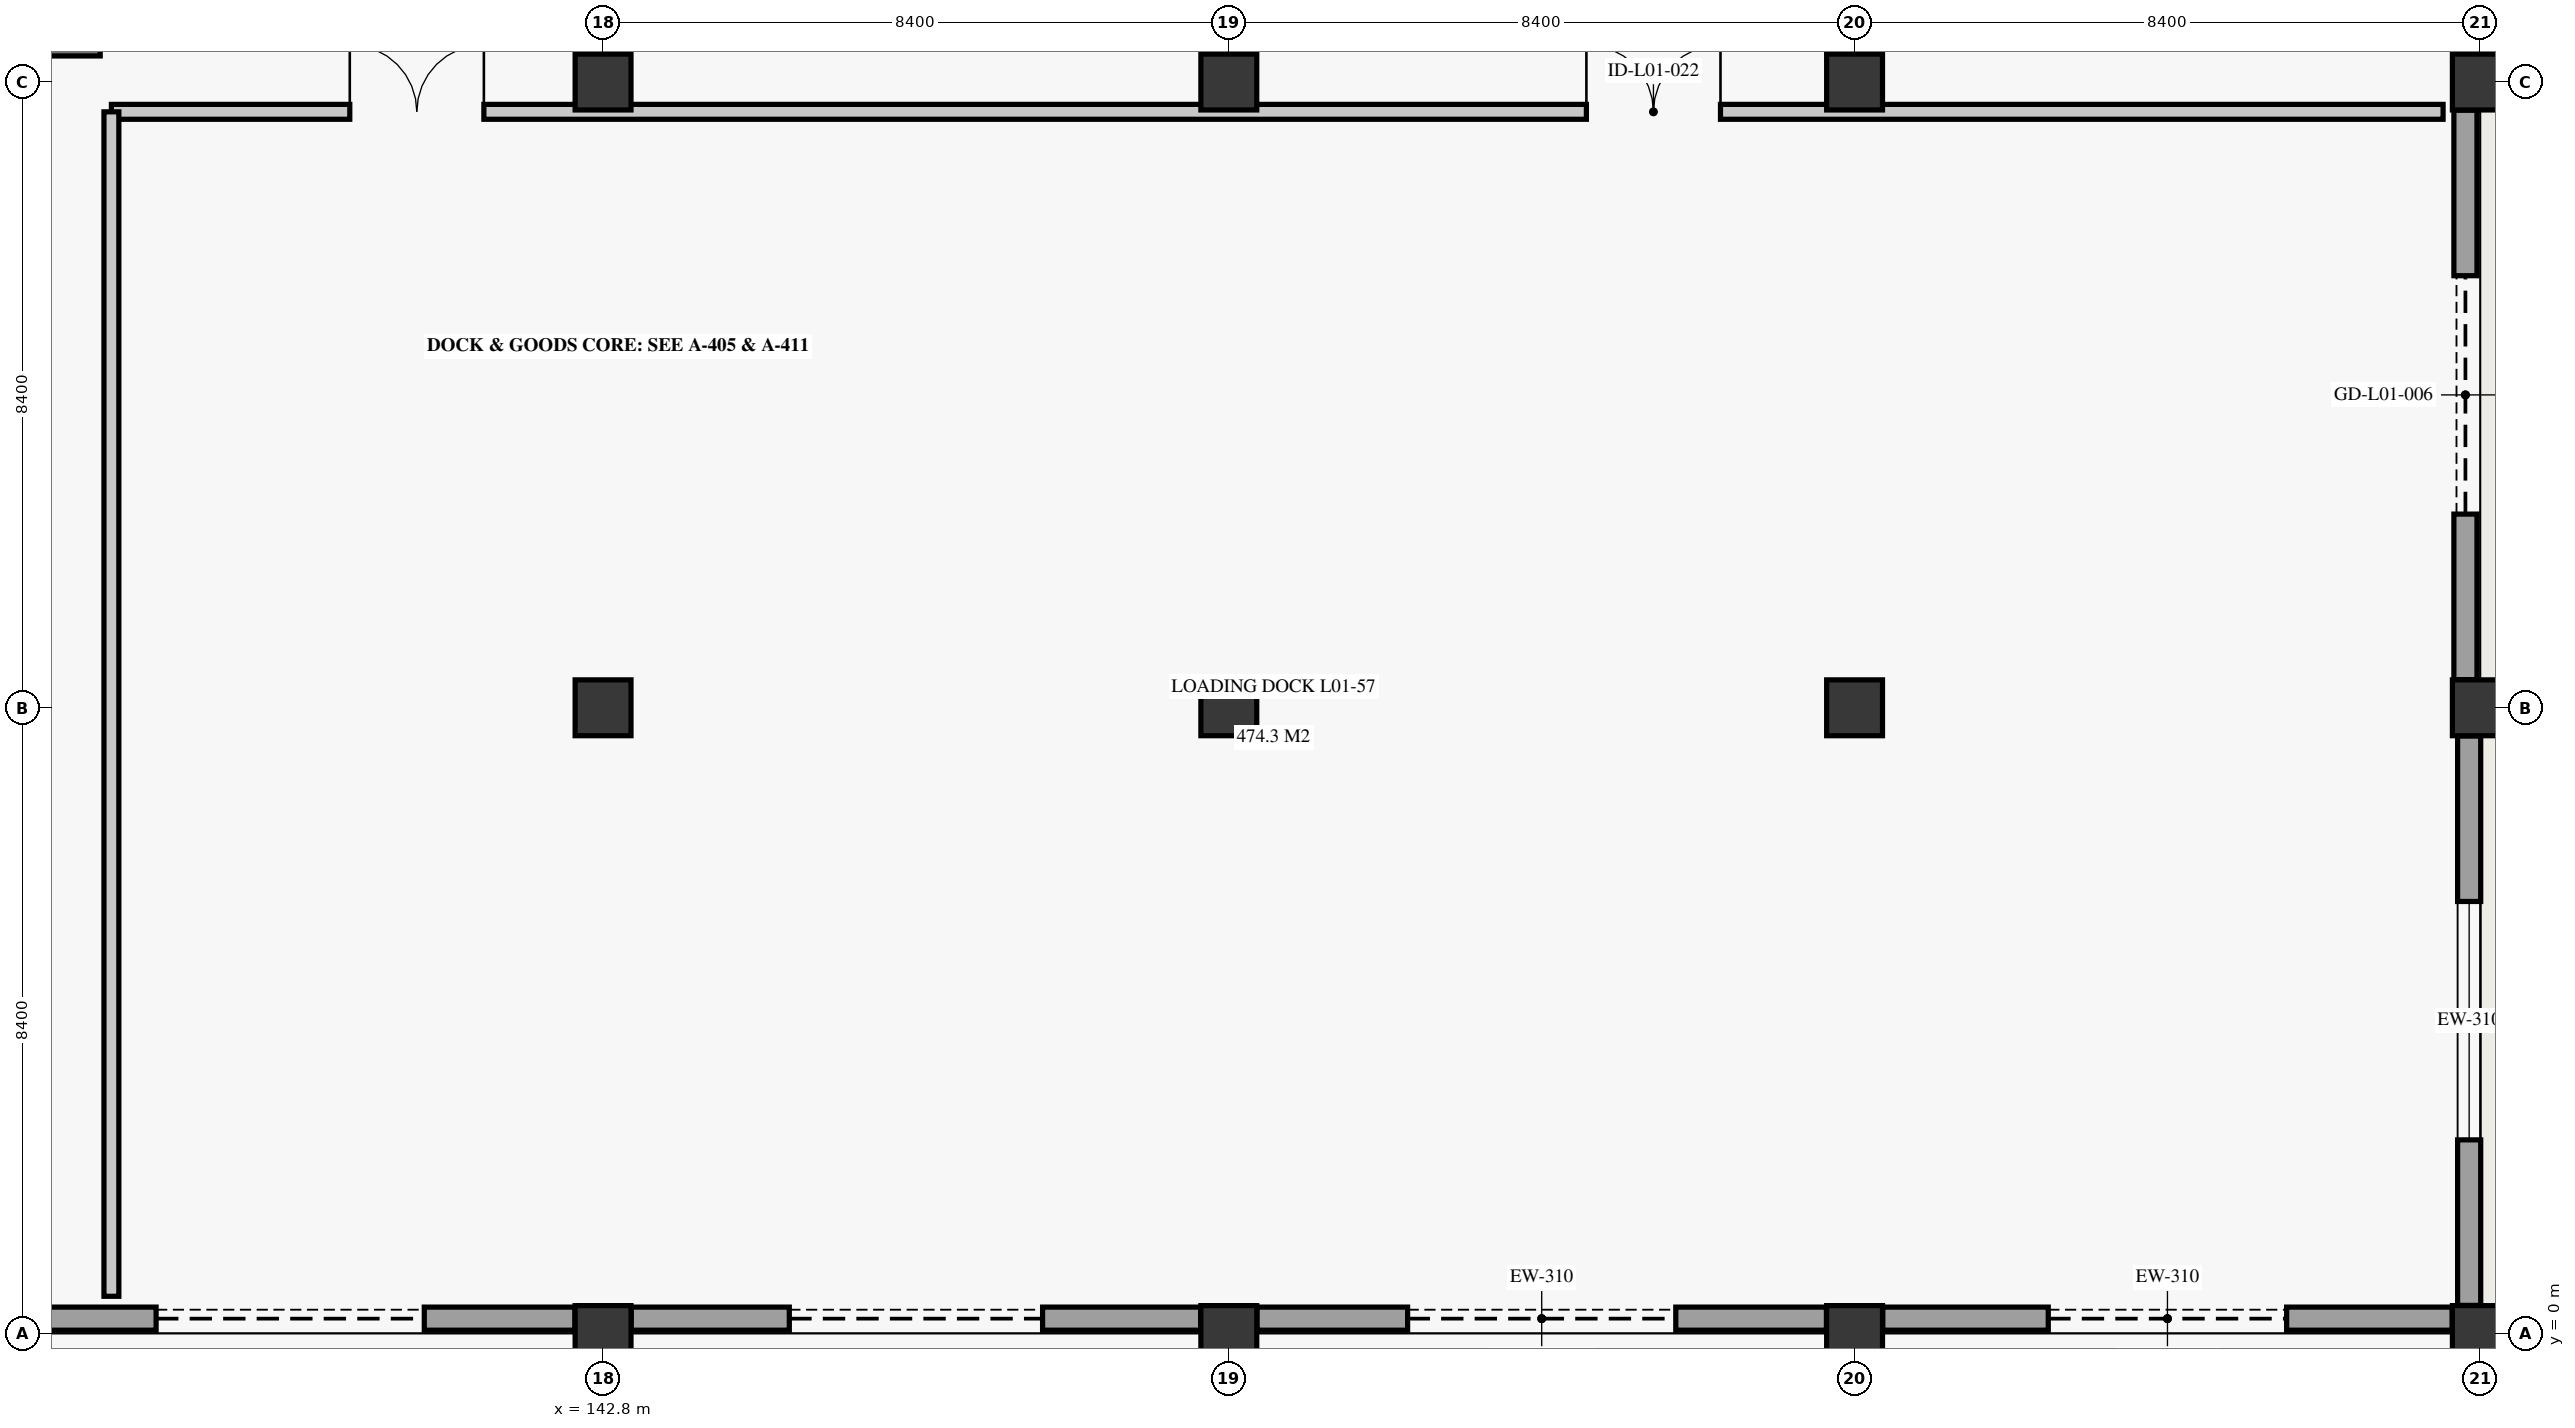
"""IFC4 building model, lengths in metres.
Left out: names, types, materials, properties, quantities, classifications, styles, units other than length and angle.
Written with IfcOpenShell. Run it as: python <this file> out.ifc"""

import sys

from ifc_helpers import new_model, si_unit, direction, frame, frame_2d, origin, origin_2d, place, context, subcontext, project, spatial, rectangle, extrude, element, fill, save


model = new_model("IFC4")
c1 = context("Model", 3, precision=1e-05, world=origin(), true_north=direction((0.0, 1.0)))
c2 = subcontext(c1, "Body", "Model", "MODEL_VIEW")
j1 = project(units=[si_unit("LENGTHUNIT", "METRE"), si_unit("PLANEANGLEUNIT", "RADIAN")], contexts=[c1])
p1 = place(None, origin())
s1 = spatial("IfcSite", under=j1, at=p1, CompositionType="ELEMENT")
p2 = place(p1, origin())
s2 = spatial("IfcBuilding", under=s1, at=p2, CompositionType="ELEMENT")
p3 = place(p2, origin())
s3 = spatial("IfcBuildingStorey", under=s2, at=p3, CompositionType="ELEMENT", Elevation=0.0)
for number, where, z_axis, x_axis in (
    (1, (142.8, 0.0, 0.0), (0.0, 0.0, 1.0), (1.0, 0.0, 0.0)),
    (2, (142.8, 8.4, 0.0), (0.0, 0.0, 1.0), (1.0, 0.0, 0.0)),
    (3, (142.8, 16.8, 0.0), (0.0, 0.0, 1.0), (1.0, 0.0, 0.0)),
    (4, (151.2, 0.0, 0.0), (0.0, 0.0, 1.0), (1.0, 0.0, 0.0)),
    (5, (151.2, 8.4, 0.0), (0.0, 0.0, 1.0), (1.0, 0.0, 0.0)),
    (6, (151.2, 16.8, 0.0), (0.0, 0.0, 1.0), (1.0, 0.0, 0.0)),
    (7, (159.6, 0.0, 0.0), (0.0, 0.0, 1.0), (1.0, 0.0, 0.0)),
    (8, (159.6, 8.4, 0.0), (0.0, 0.0, 1.0), (1.0, 0.0, 0.0)),
    (9, (159.6, 16.8, 0.0), (0.0, 0.0, 1.0), (1.0, 0.0, 0.0)),
    (10, (168.0, 0.0, 0.0), (0.0, 0.0, 1.0), (1.0, 0.0, 0.0)),
    (11, (168.0, 8.4, 0.0), (0.0, 0.0, 1.0), (1.0, 0.0, 0.0)),
    (12, (168.0, 16.8, 0.0), (0.0, 0.0, 1.0), (1.0, 0.0, 0.0)),
):
    element("IfcColumn", number, at=place(p3, frame(where, z_axis=z_axis, x_axis=x_axis)), inside=s3, PredefinedType="COLUMN", context=c2, shape_type="SweptSolid", body=[
        extrude(rectangle(XDim=0.75, YDim=0.75, at=origin_2d()), origin(), (0.0, 0.0, 1.0), 5.7),
    ])
p4 = place(p3, frame((134.778, 0.2, 0.0), z_axis=(0.0, 0.0, 1.0), x_axis=(1.0, 0.0, 0.0)))
e13 = element("IfcWall", 13, at=p4, inside=s3, PredefinedType="SOLIDWALL", context=c2, shape_type="SweptSolid", body=[
    extrude(rectangle(XDim=7.644, YDim=0.31, at=frame_2d((3.822, 0.0))), origin(), (0.0, 0.0, 1.0), 4.98),
])
p5 = place(p4, frame((2.022, 0.0, 0.0)))
e14 = element("IfcOpeningElement", 14, at=p5, cuts=e13, PredefinedType="OPENING", context=c2, shape_type="SweptSolid", body=[
    extrude(rectangle(XDim=3.6, YDim=4.05, at=frame_2d((1.8, 2.025))), frame((0.0, 0.165, 0.0), z_axis=(0.0, -1.0, 0.0), x_axis=(1.0, 0.0, 0.0)), (0.0, 0.0, 1.0), 0.33),
])
p6 = place(p3, frame((143.178, 0.2, 0.0), z_axis=(0.0, 0.0, 1.0), x_axis=(1.0, 0.0, 0.0)))
e15 = element("IfcWall", 15, at=p6, inside=s3, PredefinedType="SOLIDWALL", context=c2, shape_type="SweptSolid", body=[
    extrude(rectangle(XDim=7.644, YDim=0.31, at=frame_2d((3.822, 0.0))), origin(), (0.0, 0.0, 1.0), 4.98),
])
p7 = place(p6, frame((2.122, 0.0, 0.0)))
e16 = element("IfcOpeningElement", 16, at=p7, cuts=e15, PredefinedType="OPENING", context=c2, shape_type="SweptSolid", body=[
    extrude(rectangle(XDim=3.4, YDim=3.9, at=frame_2d((1.7, 1.95))), frame((0.0, 0.165, 0.0), z_axis=(0.0, -1.0, 0.0), x_axis=(1.0, 0.0, 0.0)), (0.0, 0.0, 1.0), 0.33),
])
p8 = place(p3, frame((151.578, 0.2, 0.0), z_axis=(0.0, 0.0, 1.0), x_axis=(1.0, 0.0, 0.0)))
e17 = element("IfcWall", 17, at=p8, inside=s3, PredefinedType="SOLIDWALL", context=c2, shape_type="SweptSolid", body=[
    extrude(rectangle(XDim=7.644, YDim=0.31, at=frame_2d((3.822, 0.0))), origin(), (0.0, 0.0, 1.0), 4.98),
])
p9 = place(p8, frame((2.022, 0.0, 0.0)))
e18 = element("IfcOpeningElement", 18, at=p9, cuts=e17, PredefinedType="OPENING", context=c2, shape_type="SweptSolid", body=[
    extrude(rectangle(XDim=3.6, YDim=4.05, at=frame_2d((1.8, 2.025))), frame((0.0, 0.165, 0.0), z_axis=(0.0, -1.0, 0.0), x_axis=(1.0, 0.0, 0.0)), (0.0, 0.0, 1.0), 0.33),
])
p10 = place(p3, frame((159.978, 0.2, 0.0), z_axis=(0.0, 0.0, 1.0), x_axis=(1.0, 0.0, 0.0)))
e19 = element("IfcWall", 19, at=p10, inside=s3, PredefinedType="SOLIDWALL", context=c2, shape_type="SweptSolid", body=[
    extrude(rectangle(XDim=7.644, YDim=0.31, at=frame_2d((3.822, 0.0))), origin(), (0.0, 0.0, 1.0), 4.98),
])
p11 = place(p10, frame((2.222, 0.0, 0.0)))
e20 = element("IfcOpeningElement", 20, at=p11, cuts=e19, PredefinedType="OPENING", context=c2, shape_type="SweptSolid", body=[
    extrude(rectangle(XDim=3.2, YDim=3.75, at=frame_2d((1.6, 1.875))), frame((0.0, 0.165, 0.0), z_axis=(0.0, -1.0, 0.0), x_axis=(1.0, 0.0, 0.0)), (0.0, 0.0, 1.0), 0.33),
])
p12 = place(p3, frame((167.85, 0.378, 0.0), z_axis=(0.0, 0.0, 1.0), x_axis=(0.0, 1.0, 0.0)))
e21 = element("IfcWall", 21, at=p12, inside=s3, PredefinedType="SOLIDWALL", context=c2, shape_type="SweptSolid", body=[
    extrude(rectangle(XDim=7.644, YDim=0.31, at=frame_2d((3.822, 0.0))), origin(), (0.0, 0.0, 1.0), 4.98),
])
p13 = place(p12, frame((2.222, 0.0, 2.35)))
e22 = element("IfcOpeningElement", 22, at=p13, cuts=e21, PredefinedType="OPENING", context=c2, shape_type="SweptSolid", body=[
    extrude(rectangle(XDim=3.2, YDim=1.0, at=frame_2d((1.6, 0.5))), frame((0.0, 0.165, 0.0), z_axis=(0.0, -1.0, 0.0), x_axis=(1.0, 0.0, 0.0)), (0.0, 0.0, 1.0), 0.33),
])
p14 = place(p3, frame((167.8, 8.778, 0.0), z_axis=(0.0, 0.0, 1.0), x_axis=(0.0, 1.0, 0.0)))
e23 = element("IfcWall", 23, at=p14, inside=s3, PredefinedType="SOLIDWALL", context=c2, shape_type="SweptSolid", body=[
    extrude(rectangle(XDim=7.644, YDim=0.31, at=frame_2d((3.822, 0.0))), origin(), (0.0, 0.0, 1.0), 4.98),
])
p15 = place(p14, frame((2.222, 0.0, 0.0)))
e24 = element("IfcOpeningElement", 24, at=p15, cuts=e23, PredefinedType="OPENING", context=c2, shape_type="SweptSolid", body=[
    extrude(rectangle(XDim=3.2, YDim=3.75, at=frame_2d((1.6, 1.875))), frame((0.0, 0.165, 0.0), z_axis=(0.0, -1.0, 0.0), x_axis=(1.0, 0.0, 0.0)), (0.0, 0.0, 1.0), 0.33),
])
p16 = place(p3, frame((167.85, 17.178, 0.0), z_axis=(0.0, 0.0, 1.0), x_axis=(0.0, 1.0, 0.0)))
e25 = element("IfcWall", 25, at=p16, inside=s3, PredefinedType="SOLIDWALL", context=c2, shape_type="SweptSolid", body=[
    extrude(rectangle(XDim=7.644, YDim=0.31, at=frame_2d((3.822, 0.0))), origin(), (0.0, 0.0, 1.0), 4.98),
])
p17 = place(p16, frame((2.222, 0.0, 2.35)))
e26 = element("IfcOpeningElement", 26, at=p17, cuts=e25, PredefinedType="OPENING", context=c2, shape_type="SweptSolid", body=[
    extrude(rectangle(XDim=3.2, YDim=1.0, at=frame_2d((1.6, 0.5))), frame((0.0, 0.165, 0.0), z_axis=(0.0, -1.0, 0.0), x_axis=(1.0, 0.0, 0.0)), (0.0, 0.0, 1.0), 0.33),
])
p18 = place(p3, frame((126.3, 17.325, 0.0), z_axis=(0.0, 0.0, 1.0), x_axis=(1.0, 0.0, 0.0)))
e27 = element("IfcWall", 27, at=p18, inside=s3, PredefinedType="SHEAR", context=c2, shape_type="SweptSolid", body=[
    extrude(rectangle(XDim=9.75, YDim=0.35, at=frame_2d((4.875, 0.0))), origin(), (0.0, 0.0, 1.0), 5.7),
])
p19 = place(p3, frame((136.2, 16.4, 0.0), z_axis=(0.0, 0.0, 1.0), x_axis=(1.0, 0.0, 0.0)))
e28 = element("IfcWall", 28, at=p19, inside=s3, PredefinedType="PARTITIONING", context=c2, shape_type="SweptSolid", body=[
    extrude(rectangle(XDim=31.3, YDim=0.2, at=frame_2d((15.65, 0.0))), origin(), (0.0, 0.0, 1.0), 5.32),
])
p20 = place(p19, frame((3.2, 0.0, 0.0)))
e29 = element("IfcOpeningElement", 29, at=p20, cuts=e28, PredefinedType="OPENING", context=c2, shape_type="SweptSolid", body=[
    extrude(rectangle(XDim=1.8, YDim=2.5, at=frame_2d((0.9, 1.25))), frame((0.0, 0.11, 0.0), z_axis=(0.0, -1.0, 0.0), x_axis=(1.0, 0.0, 0.0)), (0.0, 0.0, 1.0), 0.22),
])
p21 = place(p19, frame((19.8, 0.0, 0.0)))
e30 = element("IfcOpeningElement", 30, at=p21, cuts=e28, PredefinedType="OPENING", context=c2, shape_type="SweptSolid", body=[
    extrude(rectangle(XDim=1.8, YDim=2.5, at=frame_2d((0.9, 1.25))), frame((0.0, 0.11, 0.0), z_axis=(0.0, -1.0, 0.0), x_axis=(1.0, 0.0, 0.0)), (0.0, 0.0, 1.0), 0.22),
])
p22 = place(p3, frame((136.2, 0.5, 0.0), z_axis=(0.0, 0.0, 1.0), x_axis=(0.0, 1.0, 0.0)))
e31 = element("IfcWall", 31, at=p22, inside=s3, PredefinedType="PARTITIONING", context=c2, shape_type="SweptSolid", body=[
    extrude(rectangle(XDim=15.9, YDim=0.2, at=frame_2d((7.95, 0.0))), origin(), (0.0, 0.0, 1.0), 5.32),
])
p23 = place(p5, origin())
e32 = element("IfcDoor", 32, at=p23, inside=s3, OperationType="ROLLINGUP", PredefinedType="GATE", context=c2, shape_type="SweptSolid", body=[
    extrude(rectangle(XDim=3.6, YDim=4.05, at=frame_2d((1.8, 2.025))), frame((0.0, 0.025, 0.0), z_axis=(0.0, -1.0, 0.0), x_axis=(1.0, 0.0, 0.0)), (0.0, 0.0, 1.0), 0.05),
])
fill(e14, e32)
p24 = place(p7, origin())
e33 = element("IfcDoor", 33, at=p24, inside=s3, OperationType="ROLLINGUP", PredefinedType="GATE", context=c2, shape_type="SweptSolid", body=[
    extrude(rectangle(XDim=3.4, YDim=3.9, at=frame_2d((1.7, 1.95))), frame((0.0, 0.025, 0.0), z_axis=(0.0, -1.0, 0.0), x_axis=(1.0, 0.0, 0.0)), (0.0, 0.0, 1.0), 0.05),
])
fill(e16, e33)
p25 = place(p9, origin())
e34 = element("IfcDoor", 34, at=p25, inside=s3, OperationType="ROLLINGUP", PredefinedType="GATE", context=c2, shape_type="SweptSolid", body=[
    extrude(rectangle(XDim=3.6, YDim=4.05, at=frame_2d((1.8, 2.025))), frame((0.0, 0.025, 0.0), z_axis=(0.0, -1.0, 0.0), x_axis=(1.0, 0.0, 0.0)), (0.0, 0.0, 1.0), 0.05),
])
fill(e18, e34)
p26 = place(p11, origin())
e35 = element("IfcDoor", 35, at=p26, inside=s3, OperationType="ROLLINGUP", PredefinedType="GATE", context=c2, shape_type="SweptSolid", body=[
    extrude(rectangle(XDim=3.2, YDim=3.75, at=frame_2d((1.6, 1.875))), frame((0.0, 0.025, 0.0), z_axis=(0.0, -1.0, 0.0), x_axis=(1.0, 0.0, 0.0)), (0.0, 0.0, 1.0), 0.05),
])
fill(e20, e35)
p27 = place(p13, origin())
e36 = element("IfcWindow", 36, at=p27, inside=s3, PartitioningType="SINGLE_PANEL", PredefinedType="WINDOW", context=c2, shape_type="SweptSolid", body=[
    extrude(rectangle(XDim=3.2, YDim=1.0, at=frame_2d((1.6, 0.5))), frame((0.0, 0.03, 0.0), z_axis=(0.0, -1.0, 0.0), x_axis=(1.0, 0.0, 0.0)), (0.0, 0.0, 1.0), 0.06),
])
fill(e22, e36)
p28 = place(p15, origin())
e37 = element("IfcDoor", 37, at=p28, inside=s3, OperationType="ROLLINGUP", PredefinedType="GATE", context=c2, shape_type="SweptSolid", body=[
    extrude(rectangle(XDim=3.2, YDim=3.75, at=frame_2d((1.6, 1.875))), frame((0.0, 0.025, 0.0), z_axis=(0.0, -1.0, 0.0), x_axis=(1.0, 0.0, 0.0)), (0.0, 0.0, 1.0), 0.05),
])
fill(e24, e37)
p29 = place(p20, origin())
e38 = element("IfcDoor", 38, at=p29, inside=s3, OperationType="DOUBLE_DOOR_SINGLE_SWING", PredefinedType="DOOR", context=c2, shape_type="SweptSolid", body=[
    extrude(rectangle(XDim=1.8, YDim=2.5, at=frame_2d((0.9, 1.25))), frame((0.0, 0.025, 0.0), z_axis=(0.0, -1.0, 0.0), x_axis=(1.0, 0.0, 0.0)), (0.0, 0.0, 1.0), 0.05),
])
fill(e29, e38)
p30 = place(p21, origin())
e39 = element("IfcDoor", 39, at=p30, inside=s3, OperationType="DOUBLE_DOOR_SINGLE_SWING", PredefinedType="DOOR", context=c2, shape_type="SweptSolid", body=[
    extrude(rectangle(XDim=1.8, YDim=2.5, at=frame_2d((0.9, 1.25))), frame((0.0, 0.025, 0.0), z_axis=(0.0, -1.0, 0.0), x_axis=(1.0, 0.0, 0.0)), (0.0, 0.0, 1.0), 0.05),
])
fill(e30, e39)
save(model, sys.argv[1])
